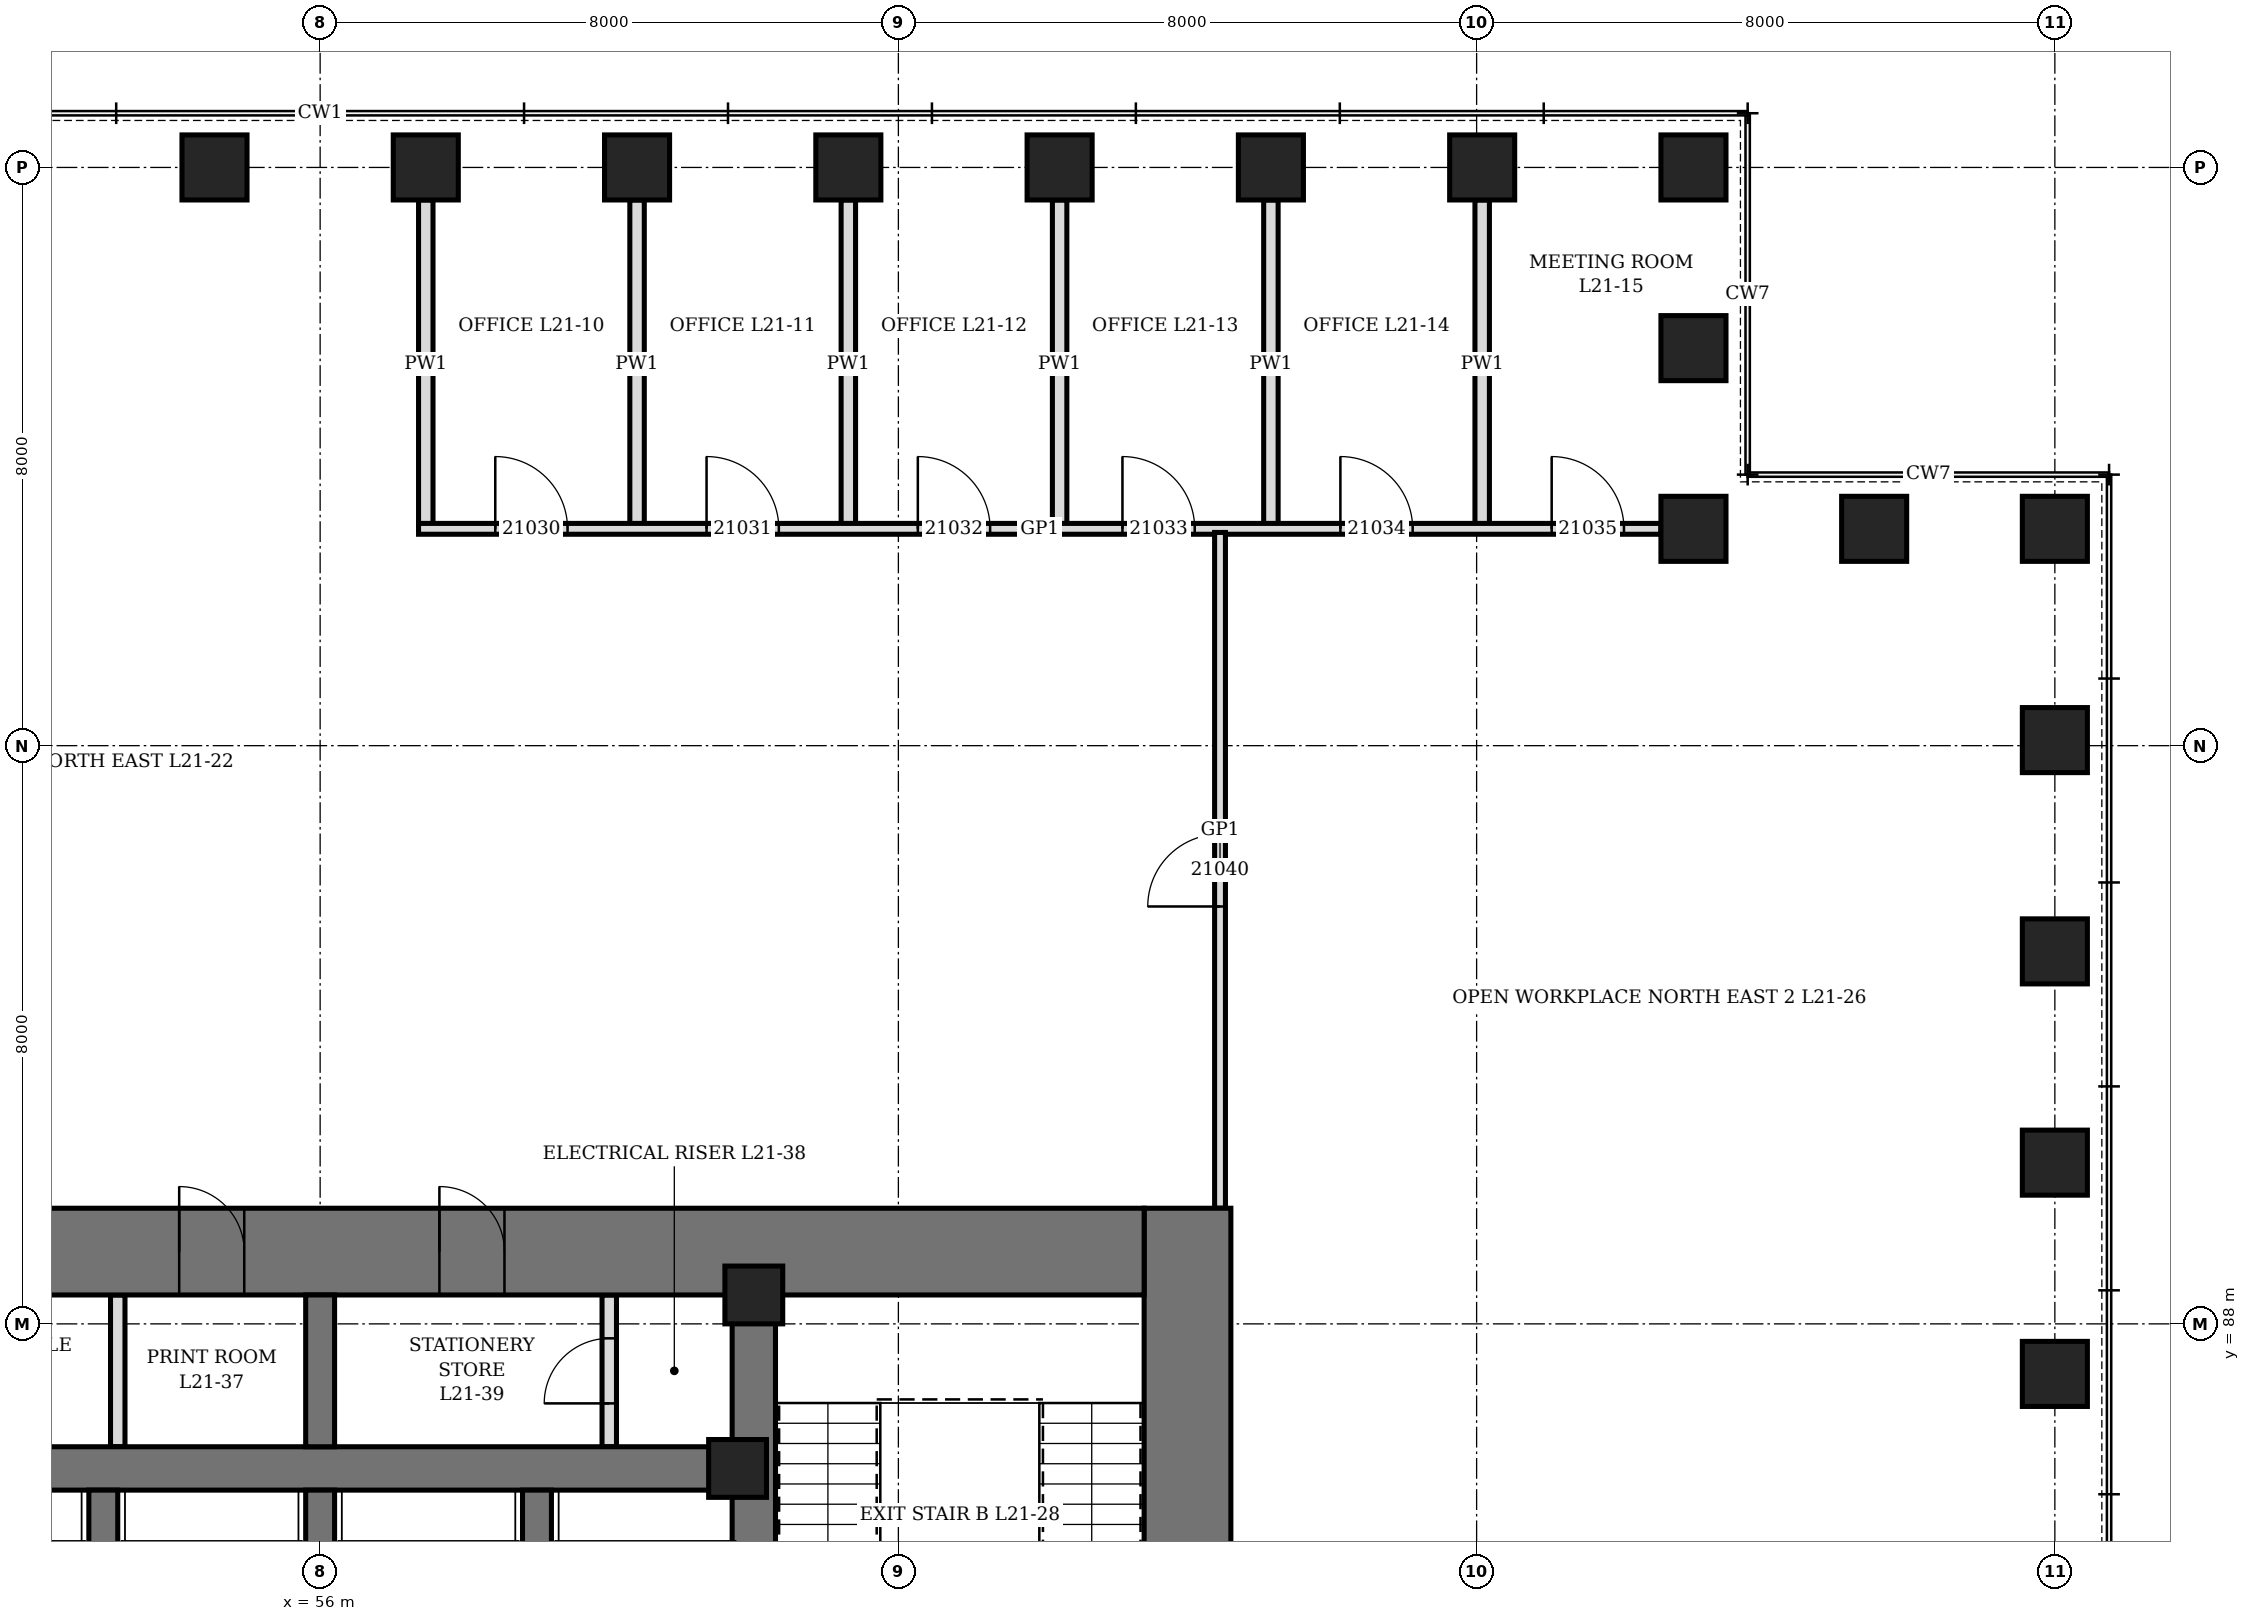
"""IFC4 building model, lengths in metres.
Left out: names, types, materials, properties, quantities, classifications, styles, units other than length and angle.
Written with IfcOpenShell. Run it as: python <this file> out.ifc"""

import sys

from ifc_helpers import new_model, si_unit, direction, frame, frame_2d, origin, origin_2d, place, context, subcontext, project, spatial, rectangle, hollow_rectangle, extrude, element, fill, save


model = new_model("IFC4")
c1 = context("Model", 3, precision=1e-05, world=origin(), true_north=direction((0.0, 1.0)))
c2 = subcontext(c1, "Body", "Model", "MODEL_VIEW")
j1 = project(units=[si_unit("LENGTHUNIT", "METRE"), si_unit("PLANEANGLEUNIT", "RADIAN")], contexts=[c1])
p1 = place(None, origin())
s1 = spatial("IfcSite", under=j1, at=p1, CompositionType="ELEMENT")
p2 = place(p1, origin())
s2 = spatial("IfcBuilding", under=s1, at=p2, CompositionType="ELEMENT")
p3 = place(p2, frame((0.0, 0.0, 97.9)))
s3 = spatial("IfcBuildingStorey", under=s2, at=p3, CompositionType="ELEMENT", Elevation=97.9)
for number, where, z_axis, x_axis in (
    (1, (80.0, 87.308, 0.0), (0.0, 0.0, 1.0), (0.0, 1.0, 0.0)),
    (2, (80.0, 90.231, 0.0), (0.0, 0.0, 1.0), (0.0, 1.0, 0.0)),
    (3, (80.0, 93.154, 0.0), (0.0, 0.0, 1.0), (0.0, 1.0, 0.0)),
    (4, (80.0, 96.077, 0.0), (0.0, 0.0, 1.0), (0.0, 1.0, 0.0)),
    (5, (80.0, 99.0, 0.0), (0.0, 0.0, 1.0), (1.0, 0.0, 0.0)),
    (6, (77.5, 99.0, 0.0), (0.0, 0.0, 1.0), (1.0, 0.0, 0.0)),
    (7, (75.0, 99.0, 0.0), (0.0, 0.0, 1.0), (0.0, 1.0, 0.0)),
    (8, (75.0, 101.5, 0.0), (0.0, 0.0, 1.0), (0.0, 1.0, 0.0)),
    (9, (75.0, 104.0, 0.0), (0.0, 0.0, 1.0), (1.0, 0.0, 0.0)),
    (10, (72.077, 104.0, 0.0), (0.0, 0.0, 1.0), (1.0, 0.0, 0.0)),
    (11, (69.154, 104.0, 0.0), (0.0, 0.0, 1.0), (1.0, 0.0, 0.0)),
    (12, (66.231, 104.0, 0.0), (0.0, 0.0, 1.0), (1.0, 0.0, 0.0)),
    (13, (63.308, 104.0, 0.0), (0.0, 0.0, 1.0), (1.0, 0.0, 0.0)),
    (14, (60.385, 104.0, 0.0), (0.0, 0.0, 1.0), (1.0, 0.0, 0.0)),
    (15, (57.461, 104.0, 0.0), (0.0, 0.0, 1.0), (1.0, 0.0, 0.0)),
    (16, (54.539, 104.0, 0.0), (0.0, 0.0, 1.0), (1.0, 0.0, 0.0)),
):
    element("IfcColumn", number, at=place(p3, frame(where, z_axis=z_axis, x_axis=x_axis)), inside=s3, PredefinedType="COLUMN", context=c2, shape_type="SweptSolid", body=[
        extrude(hollow_rectangle(XDim=0.9, YDim=0.9, WallThickness=0.12, at=origin_2d()), origin(), (0.0, 0.0, 1.0), 4.2),
    ])
p4 = place(p3, frame((68.0, 70.4, 0.0), z_axis=(0.0, 0.0, 1.0), x_axis=(0.0, 1.0, 0.0)))
e17 = element("IfcWall", 17, at=p4, inside=s3, PredefinedType="SHEAR", context=c2, shape_type="SweptSolid", body=[
    extrude(rectangle(XDim=19.2, YDim=1.2, at=frame_2d((9.6, 0.0))), origin(), (0.0, 0.0, 1.0), 4.2),
])
p5 = place(p4, frame((8.6, 0.0, 0.0)))
e18 = element("IfcOpeningElement", 18, at=p5, cuts=e17, PredefinedType="OPENING", context=c2, shape_type="SweptSolid", body=[
    extrude(rectangle(XDim=2.0, YDim=2.4, at=frame_2d((1.0, 1.2))), frame((0.0, 0.61, 0.0), z_axis=(0.0, -1.0, 0.0), x_axis=(1.0, 0.0, 0.0)), (0.0, 0.0, 1.0), 1.22),
])
p6 = place(p3, frame((44.6, 89.0, 0.0), z_axis=(0.0, 0.0, 1.0), x_axis=(1.0, 0.0, 0.0)))
e19 = element("IfcWall", 19, at=p6, inside=s3, PredefinedType="SHEAR", context=c2, shape_type="SweptSolid", body=[
    extrude(rectangle(XDim=22.8, YDim=1.2, at=frame_2d((11.4, 0.0))), origin(), (0.0, 0.0, 1.0), 4.2),
])
p7 = place(p6, frame((6.6, 0.0, 0.0)))
e20 = element("IfcOpeningElement", 20, at=p7, cuts=e19, PredefinedType="OPENING", context=c2, shape_type="SweptSolid", body=[
    extrude(rectangle(XDim=1.0, YDim=2.1, at=frame_2d((0.5, 1.05))), frame((0.0, 0.61, 0.0), z_axis=(0.0, -1.0, 0.0), x_axis=(1.0, 0.0, 0.0)), (0.0, 0.0, 1.0), 1.22),
])
p8 = place(p6, frame((9.45, 0.0, 0.0)))
e21 = element("IfcOpeningElement", 21, at=p8, cuts=e19, PredefinedType="OPENING", context=c2, shape_type="SweptSolid", body=[
    extrude(rectangle(XDim=0.9, YDim=2.1, at=frame_2d((0.45, 1.05))), frame((0.0, 0.61, 0.0), z_axis=(0.0, -1.0, 0.0), x_axis=(1.0, 0.0, 0.0)), (0.0, 0.0, 1.0), 1.22),
])
p9 = place(p6, frame((13.05, 0.0, 0.0)))
e22 = element("IfcOpeningElement", 22, at=p9, cuts=e19, PredefinedType="OPENING", context=c2, shape_type="SweptSolid", body=[
    extrude(rectangle(XDim=0.9, YDim=2.1, at=frame_2d((0.45, 1.05))), frame((0.0, 0.61, 0.0), z_axis=(0.0, -1.0, 0.0), x_axis=(1.0, 0.0, 0.0)), (0.0, 0.0, 1.0), 1.22),
])
p10 = place(p3, frame((62.0, 71.6, 0.0), z_axis=(0.0, 0.0, 1.0), x_axis=(0.0, 1.0, 0.0)))
e23 = element("IfcWall", 23, at=p10, inside=s3, PredefinedType="SHEAR", context=c2, shape_type="SweptSolid", body=[
    extrude(rectangle(XDim=16.8, YDim=0.6, at=frame_2d((8.4, 0.0))), origin(), (0.0, 0.0, 1.0), 4.2),
])
p11 = place(p10, frame((7.5, 0.0, 0.0)))
e24 = element("IfcOpeningElement", 24, at=p11, cuts=e23, PredefinedType="OPENING", context=c2, shape_type="SweptSolid", body=[
    extrude(rectangle(XDim=1.8, YDim=2.4, at=frame_2d((0.9, 1.2))), frame((0.0, 0.31, 0.0), z_axis=(0.0, -1.0, 0.0), x_axis=(1.0, 0.0, 0.0)), (0.0, 0.0, 1.0), 0.62),
])
p12 = place(p3, frame((50.3, 86.0, 0.0), z_axis=(0.0, 0.0, 1.0), x_axis=(1.0, 0.0, 0.0)))
e25 = element("IfcWall", 25, at=p12, inside=s3, PredefinedType="SHEAR", context=c2, shape_type="SweptSolid", body=[
    extrude(rectangle(XDim=11.4, YDim=0.6, at=frame_2d((5.7, 0.0))), origin(), (0.0, 0.0, 1.0), 4.2),
])
for number, where, z_axis, x_axis in (
    (26, (53.0, 82.3, 0.0), (0.0, 0.0, 1.0), (0.0, 1.0, 0.0)),
    (27, (56.0, 82.3, 0.0), (0.0, 0.0, 1.0), (0.0, 1.0, 0.0)),
    (28, (59.0, 82.3, 0.0), (0.0, 0.0, 1.0), (0.0, 1.0, 0.0)),
):
    element("IfcWall", number, at=place(p3, frame(where, z_axis=z_axis, x_axis=x_axis)), inside=s3, PredefinedType="SHEAR", context=c2, shape_type="SweptSolid", body=[
        extrude(rectangle(XDim=3.4, YDim=0.4, at=frame_2d((1.7, 0.0))), origin(), (0.0, 0.0, 1.0), 4.2),
    ])
p13 = place(p3, frame((56.0, 86.3, 0.0), z_axis=(0.0, 0.0, 1.0), x_axis=(0.0, 1.0, 0.0)))
e29 = element("IfcWall", 29, at=p13, inside=s3, PredefinedType="SHEAR", context=c2, shape_type="SweptSolid", body=[
    extrude(rectangle(XDim=2.1, YDim=0.4, at=frame_2d((1.05, 0.0))), origin(), (0.0, 0.0, 1.0), 4.2),
])
for number, where, z_axis, x_axis in (
    (30, (61.775, 86.0, 0.0), (0.0, 0.0, 1.0), (1.0, 0.0, 0.0)),
    (31, (62.0, 88.4, 0.0), (0.0, 0.0, 1.0), (1.0, 0.0, 0.0)),
):
    element("IfcColumn", number, at=place(p3, frame(where, z_axis=z_axis, x_axis=x_axis)), inside=s3, PredefinedType="COLUMN", context=c2, shape_type="SweptSolid", body=[
        extrude(hollow_rectangle(XDim=0.8, YDim=0.8, WallThickness=0.1, at=origin_2d()), origin(), (0.0, 0.0, 1.0), 4.2),
    ])
p14 = place(p3, frame((53.2, 86.3, 0.0), z_axis=(0.0, 0.0, 1.0), x_axis=(0.0, 1.0, 0.0)))
e32 = element("IfcWall", 32, at=p14, inside=s3, PredefinedType="PARTITIONING", context=c2, shape_type="SweptSolid", body=[
    extrude(rectangle(XDim=2.1, YDim=0.2, at=frame_2d((1.05, 0.0))), origin(), (0.0, 0.0, 1.0), 3.95),
])
p15 = place(p3, frame((60.0, 86.3, 0.0), z_axis=(0.0, 0.0, 1.0), x_axis=(0.0, 1.0, 0.0)))
e33 = element("IfcWall", 33, at=p15, inside=s3, PredefinedType="PARTITIONING", context=c2, shape_type="SweptSolid", body=[
    extrude(rectangle(XDim=2.1, YDim=0.2, at=frame_2d((1.05, 0.0))), origin(), (0.0, 0.0, 1.0), 3.95),
])
p16 = place(p15, frame((0.6, 0.0, 0.0)))
e34 = element("IfcOpeningElement", 34, at=p16, cuts=e33, PredefinedType="OPENING", context=c2, shape_type="SweptSolid", body=[
    extrude(rectangle(XDim=0.9, YDim=2.1, at=frame_2d((0.45, 1.05))), frame((0.0, 0.11, 0.0), z_axis=(0.0, -1.0, 0.0), x_axis=(1.0, 0.0, 0.0)), (0.0, 0.0, 1.0), 0.22),
])
for number, where, z_axis, x_axis in (
    (35, (57.461, 99.0, 0.0), (0.0, 0.0, 1.0), (0.0, 1.0, 0.0)),
    (36, (60.385, 99.0, 0.0), (0.0, 0.0, 1.0), (0.0, 1.0, 0.0)),
    (37, (63.308, 99.0, 0.0), (0.0, 0.0, 1.0), (0.0, 1.0, 0.0)),
    (38, (66.231, 99.0, 0.0), (0.0, 0.0, 1.0), (0.0, 1.0, 0.0)),
    (39, (69.154, 99.0, 0.0), (0.0, 0.0, 1.0), (0.0, 1.0, 0.0)),
):
    element("IfcWall", number, at=place(p3, frame(where, z_axis=z_axis, x_axis=x_axis)), inside=s3, PredefinedType="PARTITIONING", context=c2, shape_type="SweptSolid", body=[
        extrude(rectangle(XDim=4.55, YDim=0.2, at=frame_2d((2.275, 0.0))), origin(), (0.0, 0.0, 1.0), 1.95),
    ])
p17 = place(p3, frame((72.077, 99.0, 0.0), z_axis=(0.0, 0.0, 1.0), x_axis=(0.0, 1.0, 0.0)))
e40 = element("IfcWall", 40, at=p17, inside=s3, PredefinedType="PARTITIONING", context=c2, shape_type="SweptSolid", body=[
    extrude(rectangle(XDim=4.55, YDim=0.2, at=frame_2d((2.275, 0.0))), origin(), (0.0, 0.0, 1.0), 3.188),
])
p18 = place(p3, frame((57.362, 99.0, 0.0), z_axis=(0.0, 0.0, 1.0), x_axis=(1.0, 0.0, 0.0)))
e41 = element("IfcWall", 41, at=p18, inside=s3, PredefinedType="PARTITIONING", context=c2, shape_type="SweptSolid", body=[
    extrude(rectangle(XDim=17.188, YDim=0.15, at=frame_2d((8.594, 0.0))), origin(), (0.0, 0.0, 1.0), 3.95),
])
p19 = place(p18, frame((1.062, 0.0, 0.0)))
e42 = element("IfcOpeningElement", 42, at=p19, cuts=e41, PredefinedType="OPENING", context=c2, shape_type="SweptSolid", body=[
    extrude(rectangle(XDim=1.0, YDim=2.1, at=frame_2d((0.5, 1.05))), frame((0.0, 0.085, 0.0), z_axis=(0.0, -1.0, 0.0), x_axis=(1.0, 0.0, 0.0)), (0.0, 0.0, 1.0), 0.17),
])
p20 = place(p18, frame((3.985, 0.0, 0.0)))
e43 = element("IfcOpeningElement", 43, at=p20, cuts=e41, PredefinedType="OPENING", context=c2, shape_type="SweptSolid", body=[
    extrude(rectangle(XDim=1.0, YDim=2.1, at=frame_2d((0.5, 1.05))), frame((0.0, 0.085, 0.0), z_axis=(0.0, -1.0, 0.0), x_axis=(1.0, 0.0, 0.0)), (0.0, 0.0, 1.0), 0.17),
])
p21 = place(p18, frame((6.908, 0.0, 0.0)))
e44 = element("IfcOpeningElement", 44, at=p21, cuts=e41, PredefinedType="OPENING", context=c2, shape_type="SweptSolid", body=[
    extrude(rectangle(XDim=1.0, YDim=2.1, at=frame_2d((0.5, 1.05))), frame((0.0, 0.085, 0.0), z_axis=(0.0, -1.0, 0.0), x_axis=(1.0, 0.0, 0.0)), (0.0, 0.0, 1.0), 0.17),
])
p22 = place(p18, frame((9.739, 0.0, 0.0)))
e45 = element("IfcOpeningElement", 45, at=p22, cuts=e41, PredefinedType="OPENING", context=c2, shape_type="SweptSolid", body=[
    extrude(rectangle(XDim=1.0, YDim=2.1, at=frame_2d((0.5, 1.05))), frame((0.0, 0.085, 0.0), z_axis=(0.0, -1.0, 0.0), x_axis=(1.0, 0.0, 0.0)), (0.0, 0.0, 1.0), 0.17),
])
p23 = place(p18, frame((12.754, 0.0, 0.0)))
e46 = element("IfcOpeningElement", 46, at=p23, cuts=e41, PredefinedType="OPENING", context=c2, shape_type="SweptSolid", body=[
    extrude(rectangle(XDim=1.0, YDim=2.1, at=frame_2d((0.5, 1.05))), frame((0.0, 0.085, 0.0), z_axis=(0.0, -1.0, 0.0), x_axis=(1.0, 0.0, 0.0)), (0.0, 0.0, 1.0), 0.17),
])
p24 = place(p18, frame((15.677, 0.0, 0.0)))
e47 = element("IfcOpeningElement", 47, at=p24, cuts=e41, PredefinedType="OPENING", context=c2, shape_type="SweptSolid", body=[
    extrude(rectangle(XDim=1.0, YDim=2.4, at=frame_2d((0.5, 1.2))), frame((0.0, 0.085, 0.0), z_axis=(0.0, -1.0, 0.0), x_axis=(1.0, 0.0, 0.0)), (0.0, 0.0, 1.0), 0.17),
])
p25 = place(p3, frame((68.45, 89.6, 0.0), z_axis=(0.0, 0.0, 1.0), x_axis=(0.0, 1.0, 0.0)))
e48 = element("IfcWall", 48, at=p25, inside=s3, PredefinedType="PARTITIONING", context=c2, shape_type="SweptSolid", body=[
    extrude(rectangle(XDim=9.35, YDim=0.15, at=frame_2d((4.675, 0.0))), origin(), (0.0, 0.0, 1.0), 3.95),
])
p26 = place(p25, frame((4.175, 0.0, 0.0)))
e49 = element("IfcOpeningElement", 49, at=p26, cuts=e48, PredefinedType="OPENING", context=c2, shape_type="SweptSolid", body=[
    extrude(rectangle(XDim=1.0, YDim=2.4, at=frame_2d((0.5, 1.2))), frame((0.0, 0.085, 0.0), z_axis=(0.0, -1.0, 0.0), x_axis=(1.0, 0.0, 0.0)), (0.0, 0.0, 1.0), 0.17),
])
p27 = place(p8, origin())
e50 = element("IfcDoor", 50, at=p27, inside=s3, OperationType="SINGLE_SWING_LEFT", PredefinedType="DOOR", context=c2, shape_type="SweptSolid", body=[
    extrude(rectangle(XDim=0.9, YDim=2.1, at=frame_2d((0.45, 1.05))), frame((0.0, 0.35, 0.0), z_axis=(0.0, -1.0, 0.0), x_axis=(1.0, 0.0, 0.0)), (0.0, 0.0, 1.0), 0.7),
])
fill(e21, e50)
p28 = place(p9, origin())
e51 = element("IfcDoor", 51, at=p28, inside=s3, OperationType="SINGLE_SWING_LEFT", PredefinedType="DOOR", context=c2, shape_type="SweptSolid", body=[
    extrude(rectangle(XDim=0.9, YDim=2.1, at=frame_2d((0.45, 1.05))), frame((0.0, 0.35, 0.0), z_axis=(0.0, -1.0, 0.0), x_axis=(1.0, 0.0, 0.0)), (0.0, 0.0, 1.0), 0.7),
])
fill(e22, e51)
p29 = place(p16, origin())
e52 = element("IfcDoor", 52, at=p29, inside=s3, OperationType="SINGLE_SWING_LEFT", PredefinedType="DOOR", context=c2, shape_type="SweptSolid", body=[
    extrude(rectangle(XDim=0.9, YDim=2.1, at=frame_2d((0.45, 1.05))), frame((0.0, 0.1, 0.0), z_axis=(0.0, -1.0, 0.0), x_axis=(1.0, 0.0, 0.0)), (0.0, 0.0, 1.0), 0.199),
])
fill(e34, e52)
p30 = place(p19, origin())
e53 = element("IfcDoor", 53, at=p30, inside=s3, OperationType="SINGLE_SWING_LEFT", PredefinedType="DOOR", context=c2, shape_type="SweptSolid", body=[
    extrude(rectangle(XDim=1.0, YDim=2.1, at=frame_2d((0.5, 1.05))), frame((0.0, 0.075, 0.0), z_axis=(0.0, -1.0, 0.0), x_axis=(1.0, 0.0, 0.0)), (0.0, 0.0, 1.0), 0.149),
])
fill(e42, e53)
p31 = place(p20, origin())
e54 = element("IfcDoor", 54, at=p31, inside=s3, OperationType="SINGLE_SWING_LEFT", PredefinedType="DOOR", context=c2, shape_type="SweptSolid", body=[
    extrude(rectangle(XDim=1.0, YDim=2.1, at=frame_2d((0.5, 1.05))), frame((0.0, 0.075, 0.0), z_axis=(0.0, -1.0, 0.0), x_axis=(1.0, 0.0, 0.0)), (0.0, 0.0, 1.0), 0.149),
])
fill(e43, e54)
p32 = place(p21, origin())
e55 = element("IfcDoor", 55, at=p32, inside=s3, OperationType="SINGLE_SWING_LEFT", PredefinedType="DOOR", context=c2, shape_type="SweptSolid", body=[
    extrude(rectangle(XDim=1.0, YDim=2.1, at=frame_2d((0.5, 1.05))), frame((0.0, 0.075, 0.0), z_axis=(0.0, -1.0, 0.0), x_axis=(1.0, 0.0, 0.0)), (0.0, 0.0, 1.0), 0.149),
])
fill(e44, e55)
p33 = place(p22, origin())
e56 = element("IfcDoor", 56, at=p33, inside=s3, OperationType="SINGLE_SWING_LEFT", PredefinedType="DOOR", context=c2, shape_type="SweptSolid", body=[
    extrude(rectangle(XDim=1.0, YDim=2.1, at=frame_2d((0.5, 1.05))), frame((0.0, 0.075, 0.0), z_axis=(0.0, -1.0, 0.0), x_axis=(1.0, 0.0, 0.0)), (0.0, 0.0, 1.0), 0.149),
])
fill(e45, e56)
p34 = place(p23, origin())
e57 = element("IfcDoor", 57, at=p34, inside=s3, OperationType="SINGLE_SWING_LEFT", PredefinedType="DOOR", context=c2, shape_type="SweptSolid", body=[
    extrude(rectangle(XDim=1.0, YDim=2.1, at=frame_2d((0.5, 1.05))), frame((0.0, 0.075, 0.0), z_axis=(0.0, -1.0, 0.0), x_axis=(1.0, 0.0, 0.0)), (0.0, 0.0, 1.0), 0.149),
])
fill(e46, e57)
p35 = place(p24, origin())
e58 = element("IfcDoor", 58, at=p35, inside=s3, OperationType="SINGLE_SWING_RIGHT", PredefinedType="DOOR", context=c2, shape_type="SweptSolid", body=[
    extrude(rectangle(XDim=1.0, YDim=2.4, at=frame_2d((0.5, 1.2))), frame((0.0, 0.075, 0.0), z_axis=(0.0, -1.0, 0.0), x_axis=(1.0, 0.0, 0.0)), (0.0, 0.0, 1.0), 0.149),
])
fill(e47, e58)
p36 = place(p26, origin())
e59 = element("IfcDoor", 59, at=p36, inside=s3, OperationType="SINGLE_SWING_RIGHT", PredefinedType="DOOR", context=c2, shape_type="SweptSolid", body=[
    extrude(rectangle(XDim=1.0, YDim=2.4, at=frame_2d((0.5, 1.2))), frame((0.0, 0.075, 0.0), z_axis=(0.0, -1.0, 0.0), x_axis=(1.0, 0.0, 0.0)), (0.0, 0.0, 1.0), 0.149),
])
fill(e49, e59)
save(model, sys.argv[1])
